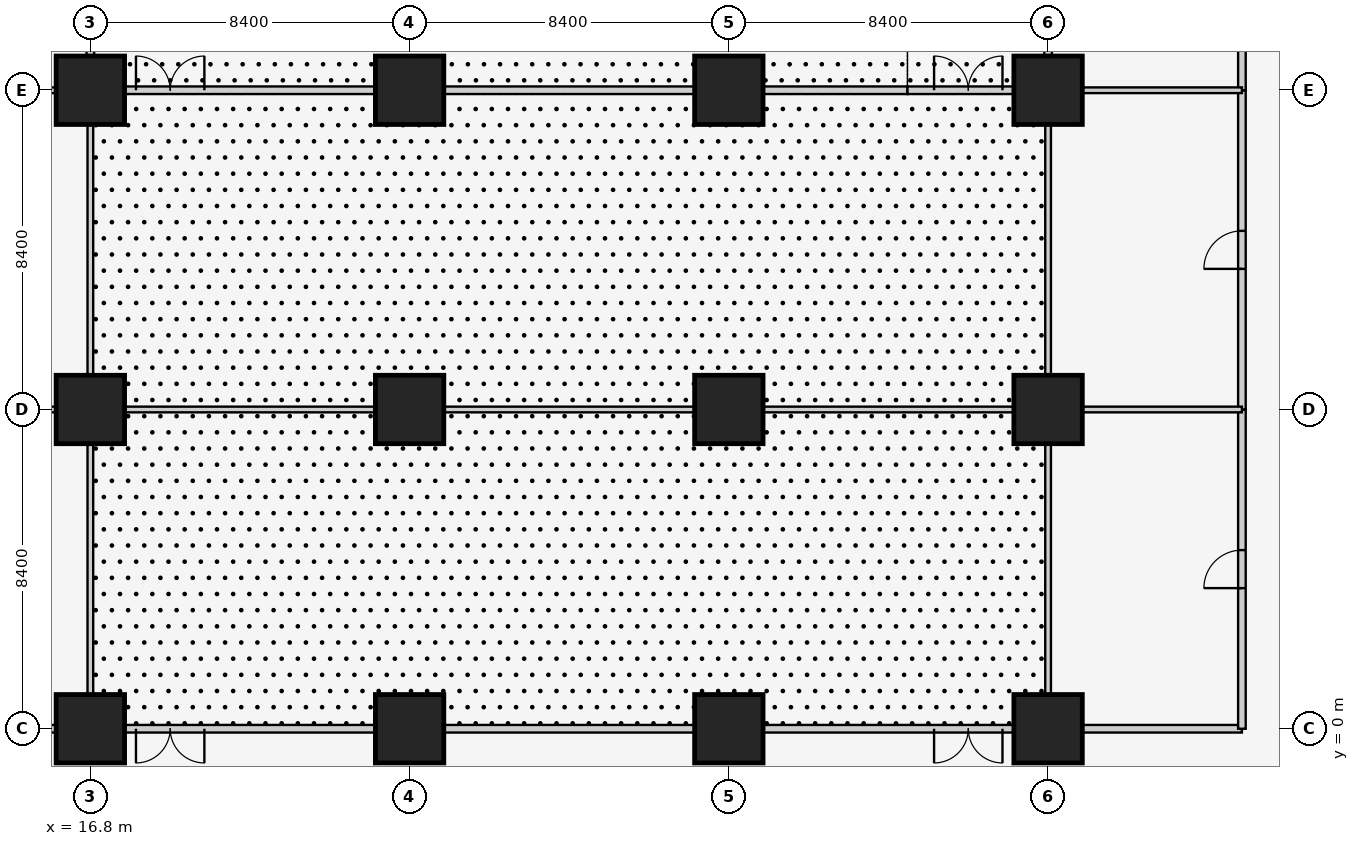
"""IFC4 building model, lengths in metres.
Left out: names, types, materials, properties, quantities, classifications, styles, units other than length and angle.
Written with IfcOpenShell. Run it as: python <this file> out.ifc"""

import sys

from ifc_helpers import new_model, si_unit, direction, frame, frame_2d, origin, origin_2d, place, context, subcontext, project, spatial, rectangle, extrude, element, fill, save


model = new_model("IFC4")
c1 = context("Model", 3, precision=1e-05, world=origin(), true_north=direction((0.0, 1.0)))
c2 = subcontext(c1, "Body", "Model", "MODEL_VIEW")
j1 = project(units=[si_unit("LENGTHUNIT", "METRE"), si_unit("PLANEANGLEUNIT", "RADIAN")], contexts=[c1])
p1 = place(None, origin())
s1 = spatial("IfcSite", under=j1, at=p1, CompositionType="ELEMENT")
p2 = place(p1, origin())
s2 = spatial("IfcBuilding", under=s1, at=p2, CompositionType="ELEMENT")
p3 = place(p2, origin())
s3 = spatial("IfcBuildingStorey", under=s2, at=p3, CompositionType="ELEMENT", Elevation=0.0)
for number, where, z_axis, x_axis in (
    (1, (16.8, 0.0, 0.0), (0.0, 0.0, 1.0), (1.0, 0.0, 0.0)),
    (2, (16.8, 8.4, 0.0), (0.0, 0.0, 1.0), (1.0, 0.0, 0.0)),
    (3, (16.8, 16.8, 0.0), (0.0, 0.0, 1.0), (1.0, 0.0, 0.0)),
    (4, (25.2, 0.0, 0.0), (0.0, 0.0, 1.0), (1.0, 0.0, 0.0)),
    (5, (25.2, 8.4, 0.0), (0.0, 0.0, 1.0), (1.0, 0.0, 0.0)),
    (6, (25.2, 16.8, 0.0), (0.0, 0.0, 1.0), (1.0, 0.0, 0.0)),
    (7, (33.6, 0.0, 0.0), (0.0, 0.0, 1.0), (1.0, 0.0, 0.0)),
    (8, (33.6, 8.4, 0.0), (0.0, 0.0, 1.0), (1.0, 0.0, 0.0)),
    (9, (33.6, 16.8, 0.0), (0.0, 0.0, 1.0), (1.0, 0.0, 0.0)),
    (10, (42.0, 0.0, 0.0), (0.0, 0.0, 1.0), (1.0, 0.0, 0.0)),
    (11, (42.0, 8.4, 0.0), (0.0, 0.0, 1.0), (1.0, 0.0, 0.0)),
    (12, (42.0, 16.8, 0.0), (0.0, 0.0, 1.0), (1.0, 0.0, 0.0)),
):
    element("IfcColumn", number, at=place(p3, frame(where, z_axis=z_axis, x_axis=x_axis)), inside=s3, PredefinedType="COLUMN", context=c2, shape_type="SweptSolid", body=[
        extrude(rectangle(XDim=1.8, YDim=1.8, at=origin_2d()), origin(), (0.0, 0.0, 1.0), 6.0),
    ])
p4 = place(p3, frame((11.7, 0.0, 0.0), z_axis=(0.0, 0.0, 1.0), x_axis=(1.0, 0.0, 0.0)))
e13 = element("IfcWall", 13, at=p4, inside=s3, PredefinedType="PARTITIONING", context=c2, shape_type="SweptSolid", body=[
    extrude(rectangle(XDim=4.2, YDim=0.2, at=frame_2d((2.1, 0.0))), origin(), (0.0, 0.0, 1.0), 5.043),
])
p5 = place(p3, frame((17.7, 0.0, 0.0), z_axis=(0.0, 0.0, 1.0), x_axis=(1.0, 0.0, 0.0)))
e14 = element("IfcWall", 14, at=p5, inside=s3, PredefinedType="PARTITIONING", context=c2, shape_type="SweptSolid", body=[
    extrude(rectangle(XDim=6.6, YDim=0.2, at=frame_2d((3.3, 0.0))), origin(), (0.0, 0.0, 1.0), 5.043),
])
p6 = place(p5, frame((0.3, 0.0, 0.0)))
e15 = element("IfcOpeningElement", 15, at=p6, cuts=e14, PredefinedType="OPENING", context=c2, shape_type="SweptSolid", body=[
    extrude(rectangle(XDim=1.8, YDim=2.4, at=frame_2d((0.9, 1.2))), frame((0.0, 0.11, 0.0), z_axis=(0.0, -1.0, 0.0), x_axis=(1.0, 0.0, 0.0)), (0.0, 0.0, 1.0), 0.22),
])
p7 = place(p3, frame((26.1, 0.0, 0.0), z_axis=(0.0, 0.0, 1.0), x_axis=(1.0, 0.0, 0.0)))
e16 = element("IfcWall", 16, at=p7, inside=s3, PredefinedType="PARTITIONING", context=c2, shape_type="SweptSolid", body=[
    extrude(rectangle(XDim=6.6, YDim=0.2, at=frame_2d((3.3, 0.0))), origin(), (0.0, 0.0, 1.0), 5.043),
])
p8 = place(p3, frame((34.5, 0.0, 0.0), z_axis=(0.0, 0.0, 1.0), x_axis=(1.0, 0.0, 0.0)))
e17 = element("IfcWall", 17, at=p8, inside=s3, PredefinedType="PARTITIONING", context=c2, shape_type="SweptSolid", body=[
    extrude(rectangle(XDim=6.6, YDim=0.2, at=frame_2d((3.3, 0.0))), origin(), (0.0, 0.0, 1.0), 5.043),
])
p9 = place(p8, frame((4.5, 0.0, 0.0)))
e18 = element("IfcOpeningElement", 18, at=p9, cuts=e17, PredefinedType="OPENING", context=c2, shape_type="SweptSolid", body=[
    extrude(rectangle(XDim=1.8, YDim=2.4, at=frame_2d((0.9, 1.2))), frame((0.0, 0.11, 0.0), z_axis=(0.0, -1.0, 0.0), x_axis=(1.0, 0.0, 0.0)), (0.0, 0.0, 1.0), 0.22),
])
p10 = place(p3, frame((42.9, 0.0, 0.0), z_axis=(0.0, 0.0, 1.0), x_axis=(1.0, 0.0, 0.0)))
e19 = element("IfcWall", 19, at=p10, inside=s3, PredefinedType="PARTITIONING", context=c2, shape_type="SweptSolid", body=[
    extrude(rectangle(XDim=4.2, YDim=0.2, at=frame_2d((2.1, 0.0))), origin(), (0.0, 0.0, 1.0), 5.043),
])
p11 = place(p3, frame((47.1, 0.0, 0.0), z_axis=(0.0, 0.0, 1.0), x_axis=(0.0, 1.0, 0.0)))
e20 = element("IfcWall", 20, at=p11, inside=s3, PredefinedType="PARTITIONING", context=c2, shape_type="SweptSolid", body=[
    extrude(rectangle(XDim=8.4, YDim=0.2, at=frame_2d((4.2, 0.0))), origin(), (0.0, 0.0, 1.0), 5.8),
])
p12 = place(p11, frame((3.7, 0.0, 0.0)))
e21 = element("IfcOpeningElement", 21, at=p12, cuts=e20, PredefinedType="OPENING", context=c2, shape_type="SweptSolid", body=[
    extrude(rectangle(XDim=1.0, YDim=2.1, at=frame_2d((0.5, 1.05))), frame((0.0, 0.11, 0.0), z_axis=(0.0, -1.0, 0.0), x_axis=(1.0, 0.0, 0.0)), (0.0, 0.0, 1.0), 0.22),
])
p13 = place(p3, frame((47.1, 8.4, 0.0), z_axis=(0.0, 0.0, 1.0), x_axis=(0.0, 1.0, 0.0)))
e22 = element("IfcWall", 22, at=p13, inside=s3, PredefinedType="PARTITIONING", context=c2, shape_type="SweptSolid", body=[
    extrude(rectangle(XDim=8.4, YDim=0.2, at=frame_2d((4.2, 0.0))), origin(), (0.0, 0.0, 1.0), 5.8),
])
p14 = place(p13, frame((3.7, 0.0, 0.0)))
e23 = element("IfcOpeningElement", 23, at=p14, cuts=e22, PredefinedType="OPENING", context=c2, shape_type="SweptSolid", body=[
    extrude(rectangle(XDim=1.0, YDim=2.1, at=frame_2d((0.5, 1.05))), frame((0.0, 0.11, 0.0), z_axis=(0.0, -1.0, 0.0), x_axis=(1.0, 0.0, 0.0)), (0.0, 0.0, 1.0), 0.22),
])
p15 = place(p3, frame((47.1, 16.8, 0.0), z_axis=(0.0, 0.0, 1.0), x_axis=(0.0, 1.0, 0.0)))
e24 = element("IfcWall", 24, at=p15, inside=s3, PredefinedType="PARTITIONING", context=c2, shape_type="SweptSolid", body=[
    extrude(rectangle(XDim=8.4, YDim=0.2, at=frame_2d((4.2, 0.0))), origin(), (0.0, 0.0, 1.0), 5.8),
])
p16 = place(p15, frame((3.7, 0.0, 0.0)))
e25 = element("IfcOpeningElement", 25, at=p16, cuts=e24, PredefinedType="OPENING", context=c2, shape_type="SweptSolid", body=[
    extrude(rectangle(XDim=1.0, YDim=2.1, at=frame_2d((0.5, 1.05))), frame((0.0, 0.11, 0.0), z_axis=(0.0, -1.0, 0.0), x_axis=(1.0, 0.0, 0.0)), (0.0, 0.0, 1.0), 0.22),
])
p17 = place(p3, frame((24.3, 16.8, 0.0), z_axis=(0.0, 0.0, 1.0), x_axis=(-1.0, 0.0, 0.0)))
e26 = element("IfcWall", 26, at=p17, inside=s3, PredefinedType="PARTITIONING", context=c2, shape_type="SweptSolid", body=[
    extrude(rectangle(XDim=6.6, YDim=0.2, at=frame_2d((3.3, 0.0))), origin(), (0.0, 0.0, 1.0), 5.043),
])
p18 = place(p17, frame((4.5, 0.0, 0.0)))
e27 = element("IfcOpeningElement", 27, at=p18, cuts=e26, PredefinedType="OPENING", context=c2, shape_type="SweptSolid", body=[
    extrude(rectangle(XDim=1.8, YDim=2.4, at=frame_2d((0.9, 1.2))), frame((0.0, 0.11, 0.0), z_axis=(0.0, -1.0, 0.0), x_axis=(1.0, 0.0, 0.0)), (0.0, 0.0, 1.0), 0.22),
])
p19 = place(p3, frame((32.7, 16.8, 0.0), z_axis=(0.0, 0.0, 1.0), x_axis=(-1.0, 0.0, 0.0)))
e28 = element("IfcWall", 28, at=p19, inside=s3, PredefinedType="PARTITIONING", context=c2, shape_type="SweptSolid", body=[
    extrude(rectangle(XDim=6.6, YDim=0.2, at=frame_2d((3.3, 0.0))), origin(), (0.0, 0.0, 1.0), 5.043),
])
p20 = place(p3, frame((38.3, 16.8, 0.0), z_axis=(0.0, 0.0, 1.0), x_axis=(-1.0, 0.0, 0.0)))
e29 = element("IfcWall", 29, at=p20, inside=s3, PredefinedType="PARTITIONING", context=c2, shape_type="SweptSolid", body=[
    extrude(rectangle(XDim=3.8, YDim=0.2, at=frame_2d((1.9, 0.0))), origin(), (0.0, 0.0, 1.0), 5.043),
])
p21 = place(p3, frame((16.8, 17.7, 0.0), z_axis=(0.0, 0.0, 1.0), x_axis=(0.0, 1.0, 0.0)))
e30 = element("IfcWall", 30, at=p21, inside=s3, PredefinedType="PARTITIONING", context=c2, shape_type="SweptSolid", body=[
    extrude(rectangle(XDim=6.6, YDim=0.2, at=frame_2d((3.3, 0.0))), origin(), (0.0, 0.0, 1.0), 5.043),
])
p22 = place(p3, frame((41.1, 16.8, 0.0), z_axis=(0.0, 0.0, 1.0), x_axis=(-1.0, 0.0, 0.0)))
e31 = element("IfcWall", 31, at=p22, inside=s3, PredefinedType="PARTITIONING", context=c2, shape_type="SweptSolid", body=[
    extrude(rectangle(XDim=2.8, YDim=0.2, at=frame_2d((1.4, 0.0))), origin(), (0.0, 0.0, 1.0), 5.043),
])
p23 = place(p22, frame((0.3, 0.0, 0.0)))
e32 = element("IfcOpeningElement", 32, at=p23, cuts=e31, PredefinedType="OPENING", context=c2, shape_type="SweptSolid", body=[
    extrude(rectangle(XDim=1.8, YDim=2.4, at=frame_2d((0.9, 1.2))), frame((0.0, 0.11, 0.0), z_axis=(0.0, -1.0, 0.0), x_axis=(1.0, 0.0, 0.0)), (0.0, 0.0, 1.0), 0.22),
])
p24 = place(p3, frame((42.0, 24.3, 0.0), z_axis=(0.0, 0.0, 1.0), x_axis=(0.0, -1.0, 0.0)))
e33 = element("IfcWall", 33, at=p24, inside=s3, PredefinedType="PARTITIONING", context=c2, shape_type="SweptSolid", body=[
    extrude(rectangle(XDim=6.6, YDim=0.2, at=frame_2d((3.3, 0.0))), origin(), (0.0, 0.0, 1.0), 5.043),
])
p25 = place(p3, frame((16.8, 7.5, 0.0), z_axis=(0.0, 0.0, 1.0), x_axis=(0.0, -1.0, 0.0)))
e34 = element("IfcWall", 34, at=p25, inside=s3, PredefinedType="PARTITIONING", context=c2, shape_type="SweptSolid", body=[
    extrude(rectangle(XDim=6.6, YDim=0.15, at=frame_2d((3.3, 0.0))), origin(), (0.0, 0.0, 1.0), 5.043),
])
p26 = place(p3, frame((11.7, 8.4, 0.0), z_axis=(0.0, 0.0, 1.0), x_axis=(1.0, 0.0, 0.0)))
e35 = element("IfcWall", 35, at=p26, inside=s3, PredefinedType="PARTITIONING", context=c2, shape_type="SweptSolid", body=[
    extrude(rectangle(XDim=4.2, YDim=0.15, at=frame_2d((2.1, 0.0))), origin(), (0.0, 0.0, 1.0), 5.043),
])
for number, where, z_axis, x_axis in (
    (36, (42.0, 7.5, 0.0), (0.0, 0.0, 1.0), (0.0, -1.0, 0.0)),
    (37, (17.7, 8.4, 0.0), (0.0, 0.0, 1.0), (1.0, 0.0, 0.0)),
):
    element("IfcWall", number, at=place(p3, frame(where, z_axis=z_axis, x_axis=x_axis)), inside=s3, PredefinedType="PARTITIONING", context=c2, shape_type="SweptSolid", body=[
        extrude(rectangle(XDim=6.6, YDim=0.15, at=frame_2d((3.3, 0.0))), origin(), (0.0, 0.0, 1.0), 5.043),
    ])
p27 = place(p3, frame((26.1, 8.4, 0.0), z_axis=(0.0, 0.0, 1.0), x_axis=(1.0, 0.0, 0.0)))
e38 = element("IfcWall", 38, at=p27, inside=s3, PredefinedType="PARTITIONING", context=c2, shape_type="SweptSolid", body=[
    extrude(rectangle(XDim=6.6, YDim=0.15, at=frame_2d((3.3, 0.0))), origin(), (0.0, 0.0, 1.0), 5.043),
])
p28 = place(p3, frame((34.5, 8.4, 0.0), z_axis=(0.0, 0.0, 1.0), x_axis=(1.0, 0.0, 0.0)))
e39 = element("IfcWall", 39, at=p28, inside=s3, PredefinedType="PARTITIONING", context=c2, shape_type="SweptSolid", body=[
    extrude(rectangle(XDim=6.6, YDim=0.15, at=frame_2d((3.3, 0.0))), origin(), (0.0, 0.0, 1.0), 5.043),
])
p29 = place(p3, frame((42.9, 8.4, 0.0), z_axis=(0.0, 0.0, 1.0), x_axis=(1.0, 0.0, 0.0)))
e40 = element("IfcWall", 40, at=p29, inside=s3, PredefinedType="PARTITIONING", context=c2, shape_type="SweptSolid", body=[
    extrude(rectangle(XDim=4.2, YDim=0.15, at=frame_2d((2.1, 0.0))), origin(), (0.0, 0.0, 1.0), 5.043),
])
p30 = place(p3, frame((16.8, 15.9, 0.0), z_axis=(0.0, 0.0, 1.0), x_axis=(0.0, -1.0, 0.0)))
e41 = element("IfcWall", 41, at=p30, inside=s3, PredefinedType="PARTITIONING", context=c2, shape_type="SweptSolid", body=[
    extrude(rectangle(XDim=6.6, YDim=0.15, at=frame_2d((3.3, 0.0))), origin(), (0.0, 0.0, 1.0), 5.043),
])
p31 = place(p3, frame((11.7, 16.8, 0.0), z_axis=(0.0, 0.0, 1.0), x_axis=(1.0, 0.0, 0.0)))
e42 = element("IfcWall", 42, at=p31, inside=s3, PredefinedType="PARTITIONING", context=c2, shape_type="SweptSolid", body=[
    extrude(rectangle(XDim=4.2, YDim=0.15, at=frame_2d((2.1, 0.0))), origin(), (0.0, 0.0, 1.0), 5.043),
])
p32 = place(p3, frame((42.0, 15.9, 0.0), z_axis=(0.0, 0.0, 1.0), x_axis=(0.0, -1.0, 0.0)))
e43 = element("IfcWall", 43, at=p32, inside=s3, PredefinedType="PARTITIONING", context=c2, shape_type="SweptSolid", body=[
    extrude(rectangle(XDim=6.6, YDim=0.15, at=frame_2d((3.3, 0.0))), origin(), (0.0, 0.0, 1.0), 5.043),
])
p33 = place(p3, frame((42.9, 16.8, 0.0), z_axis=(0.0, 0.0, 1.0), x_axis=(1.0, 0.0, 0.0)))
e44 = element("IfcWall", 44, at=p33, inside=s3, PredefinedType="PARTITIONING", context=c2, shape_type="SweptSolid", body=[
    extrude(rectangle(XDim=4.2, YDim=0.15, at=frame_2d((2.1, 0.0))), origin(), (0.0, 0.0, 1.0), 5.043),
])
p34 = place(p6, frame((1.8, 0.0, 0.0), z_axis=(0.0, 0.0, 1.0), x_axis=(-1.0, 0.0, 0.0)))
e45 = element("IfcDoor", 45, at=p34, inside=s3, OperationType="DOUBLE_DOOR_SINGLE_SWING", PredefinedType="DOOR", context=c2, shape_type="SweptSolid", body=[
    extrude(rectangle(XDim=1.8, YDim=2.4, at=frame_2d((0.9, 1.2))), frame((0.0, 0.025, 0.0), z_axis=(0.0, -1.0, 0.0), x_axis=(1.0, 0.0, 0.0)), (0.0, 0.0, 1.0), 0.05),
])
fill(e15, e45)
p35 = place(p9, frame((1.8, 0.0, 0.0), z_axis=(0.0, 0.0, 1.0), x_axis=(-1.0, 0.0, 0.0)))
e46 = element("IfcDoor", 46, at=p35, inside=s3, OperationType="DOUBLE_DOOR_SINGLE_SWING", PredefinedType="DOOR", context=c2, shape_type="SweptSolid", body=[
    extrude(rectangle(XDim=1.8, YDim=2.4, at=frame_2d((0.9, 1.2))), frame((0.0, 0.025, 0.0), z_axis=(0.0, -1.0, 0.0), x_axis=(1.0, 0.0, 0.0)), (0.0, 0.0, 1.0), 0.05),
])
fill(e18, e46)
p36 = place(p12, origin())
e47 = element("IfcDoor", 47, at=p36, inside=s3, OperationType="SINGLE_SWING_LEFT", PredefinedType="DOOR", context=c2, shape_type="SweptSolid", body=[
    extrude(rectangle(XDim=1.0, YDim=2.1, at=frame_2d((0.5, 1.05))), frame((0.0, 0.025, 0.0), z_axis=(0.0, -1.0, 0.0), x_axis=(1.0, 0.0, 0.0)), (0.0, 0.0, 1.0), 0.05),
])
fill(e21, e47)
p37 = place(p18, frame((1.8, 0.0, 0.0), z_axis=(0.0, 0.0, 1.0), x_axis=(-1.0, 0.0, 0.0)))
e48 = element("IfcDoor", 48, at=p37, inside=s3, OperationType="DOUBLE_DOOR_SINGLE_SWING", PredefinedType="DOOR", context=c2, shape_type="SweptSolid", body=[
    extrude(rectangle(XDim=1.8, YDim=2.4, at=frame_2d((0.9, 1.2))), frame((0.0, 0.025, 0.0), z_axis=(0.0, -1.0, 0.0), x_axis=(1.0, 0.0, 0.0)), (0.0, 0.0, 1.0), 0.05),
])
fill(e27, e48)
p38 = place(p23, frame((1.8, 0.0, 0.0), z_axis=(0.0, 0.0, 1.0), x_axis=(-1.0, 0.0, 0.0)))
e49 = element("IfcDoor", 49, at=p38, inside=s3, OperationType="DOUBLE_DOOR_SINGLE_SWING", PredefinedType="DOOR", context=c2, shape_type="SweptSolid", body=[
    extrude(rectangle(XDim=1.8, YDim=2.4, at=frame_2d((0.9, 1.2))), frame((0.0, 0.025, 0.0), z_axis=(0.0, -1.0, 0.0), x_axis=(1.0, 0.0, 0.0)), (0.0, 0.0, 1.0), 0.05),
])
fill(e32, e49)
p39 = place(p14, origin())
e50 = element("IfcDoor", 50, at=p39, inside=s3, OperationType="SINGLE_SWING_LEFT", PredefinedType="DOOR", context=c2, shape_type="SweptSolid", body=[
    extrude(rectangle(XDim=1.0, YDim=2.1, at=frame_2d((0.5, 1.05))), frame((0.0, 0.025, 0.0), z_axis=(0.0, -1.0, 0.0), x_axis=(1.0, 0.0, 0.0)), (0.0, 0.0, 1.0), 0.05),
])
fill(e23, e50)
save(model, sys.argv[1])
